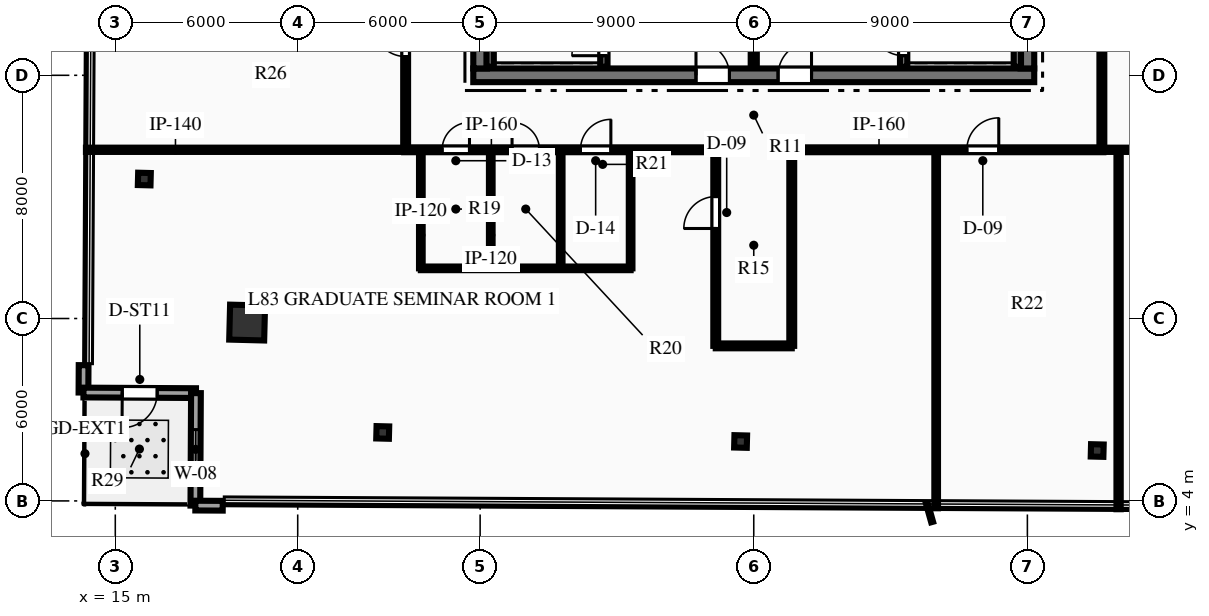
"""IFC4 building model, lengths in metres.
Left out: names, types, materials, properties, quantities, classifications, styles, units other than length and angle.
Written with IfcOpenShell. Run it as: python <this file> out.ifc"""

import sys

from ifc_helpers import new_model, si_unit, direction, frame, frame_2d, origin, origin_2d, place, context, subcontext, project, spatial, rectangle, hollow_rectangle, i_section, extrude, element, fill, save


model = new_model("IFC4")
c1 = context("Model", 3, precision=1e-05, world=origin(), true_north=direction((0.0, 1.0)))
c2 = subcontext(c1, "Body", "Model", "MODEL_VIEW")
j1 = project(units=[si_unit("LENGTHUNIT", "METRE"), si_unit("PLANEANGLEUNIT", "RADIAN")], contexts=[c1])
p1 = place(None, origin())
s1 = spatial("IfcSite", under=j1, at=p1, CompositionType="ELEMENT")
p2 = place(p1, origin())
s2 = spatial("IfcBuilding", under=s1, at=p2, CompositionType="ELEMENT")
p3 = place(p2, frame((0.0, 0.0, 328.95)))
s3 = spatial("IfcBuildingStorey", under=s2, at=p3, CompositionType="ELEMENT", Elevation=328.95)
p4 = place(p3, frame((26.775, 18.0, 0.0), z_axis=(0.0, 0.0, 1.0), x_axis=(1.0, 0.0, 0.0)))
e1 = element("IfcWall", 1, at=p4, inside=s3, PredefinedType="SHEAR", context=c2, shape_type="SweptSolid", body=[
    extrude(rectangle(XDim=18.45, YDim=0.45, at=frame_2d((9.225, 0.0))), origin(), (0.0, 0.0, 1.0), 3.75),
])
p5 = place(p4, frame((7.325, 0.0, 0.0)))
e2 = element("IfcOpeningElement", 2, at=p5, cuts=e1, PredefinedType="OPENING", context=c2, shape_type="SweptSolid", body=[
    extrude(rectangle(XDim=1.1, YDim=2.15, at=frame_2d((0.55, 1.075))), frame((0.0, 0.235, 0.0), z_axis=(0.0, -1.0, 0.0), x_axis=(1.0, 0.0, 0.0)), (0.0, 0.0, 1.0), 0.47),
])
p6 = place(p4, frame((10.025, 0.0, 0.0)))
e3 = element("IfcOpeningElement", 3, at=p6, cuts=e1, PredefinedType="OPENING", context=c2, shape_type="SweptSolid", body=[
    extrude(rectangle(XDim=1.1, YDim=2.15, at=frame_2d((0.55, 1.075))), frame((0.0, 0.235, 0.0), z_axis=(0.0, -1.0, 0.0), x_axis=(1.0, 0.0, 0.0)), (0.0, 0.0, 1.0), 0.47),
])
p7 = place(p3, frame((27.0, 18.225, 0.0), z_axis=(0.0, 0.0, 1.0), x_axis=(0.0, 1.0, 0.0)))
e4 = element("IfcWall", 4, at=p7, inside=s3, PredefinedType="SHEAR", context=c2, shape_type="SweptSolid", body=[
    extrude(rectangle(XDim=15.55, YDim=0.45, at=frame_2d((7.775, 0.0))), origin(), (0.0, 0.0, 1.0), 3.75),
])
p8 = place(p7, frame((10.015, 0.0, 0.0)))
e5 = element("IfcOpeningElement", 5, at=p8, cuts=e4, PredefinedType="OPENING", context=c2, shape_type="SweptSolid", body=[
    extrude(rectangle(XDim=1.4, YDim=2.2, at=frame_2d((0.7, 1.1))), frame((0.0, 0.235, 0.0), z_axis=(0.0, -1.0, 0.0), x_axis=(1.0, 0.0, 0.0)), (0.0, 0.0, 1.0), 0.47),
])
p9 = place(p3, frame((45.0, 18.225, 0.0), z_axis=(0.0, 0.0, 1.0), x_axis=(0.0, 1.0, 0.0)))
e6 = element("IfcWall", 6, at=p9, inside=s3, PredefinedType="SHEAR", context=c2, shape_type="SweptSolid", body=[
    extrude(rectangle(XDim=15.55, YDim=0.45, at=frame_2d((7.775, 0.0))), origin(), (0.0, 0.0, 1.0), 3.75),
])
p10 = place(p9, frame((10.015, 0.0, 0.0)))
e7 = element("IfcOpeningElement", 7, at=p10, cuts=e6, PredefinedType="OPENING", context=c2, shape_type="SweptSolid", body=[
    extrude(rectangle(XDim=1.4, YDim=2.2, at=frame_2d((0.7, 1.1))), frame((0.0, 0.235, 0.0), z_axis=(0.0, -1.0, 0.0), x_axis=(1.0, 0.0, 0.0)), (0.0, 0.0, 1.0), 0.47),
])
p11 = place(p3, frame((31.07, 18.28, 0.0), z_axis=(0.0, 0.0, 1.0), x_axis=(0.0, 1.0, 0.0)))
e8 = element("IfcWall", 8, at=p11, inside=s3, PredefinedType="SHEAR", context=c2, shape_type="SweptSolid", body=[
    extrude(rectangle(XDim=8.26, YDim=0.24, at=frame_2d((4.13, 0.0))), origin(), (0.0, 0.0, 1.0), 3.75),
])
p12 = place(p11, frame((0.365, 0.0, 0.0)))
e9 = element("IfcOpeningElement", 9, at=p12, cuts=e8, PredefinedType="OPENING", context=c2, shape_type="SweptSolid", body=[
    extrude(rectangle(XDim=1.05, YDim=2.15, at=frame_2d((0.525, 1.075))), frame((0.0, 0.13, 0.0), z_axis=(0.0, -1.0, 0.0), x_axis=(1.0, 0.0, 0.0)), (0.0, 0.0, 1.0), 0.26),
])
p13 = place(p3, frame((27.33, 18.28, 0.0), z_axis=(0.0, 0.0, 1.0), x_axis=(0.0, 1.0, 0.0)))
e10 = element("IfcWall", 10, at=p13, inside=s3, PredefinedType="SHEAR", context=c2, shape_type="SweptSolid", body=[
    extrude(rectangle(XDim=8.26, YDim=0.24, at=frame_2d((4.13, 0.0))), origin(), (0.0, 0.0, 1.0), 3.75),
])
p14 = place(p3, frame((40.93, 18.28, 0.0), z_axis=(0.0, 0.0, 1.0), x_axis=(0.0, 1.0, 0.0)))
e11 = element("IfcWall", 11, at=p14, inside=s3, PredefinedType="SHEAR", context=c2, shape_type="SweptSolid", body=[
    extrude(rectangle(XDim=8.26, YDim=0.24, at=frame_2d((4.13, 0.0))), origin(), (0.0, 0.0, 1.0), 3.75),
])
p15 = place(p14, frame((0.365, 0.0, 0.0)))
e12 = element("IfcOpeningElement", 12, at=p15, cuts=e11, PredefinedType="OPENING", context=c2, shape_type="SweptSolid", body=[
    extrude(rectangle(XDim=1.05, YDim=2.15, at=frame_2d((0.525, 1.075))), frame((0.0, 0.13, 0.0), z_axis=(0.0, -1.0, 0.0), x_axis=(1.0, 0.0, 0.0)), (0.0, 0.0, 1.0), 0.26),
])
p16 = place(p3, frame((44.67, 18.28, 0.0), z_axis=(0.0, 0.0, 1.0), x_axis=(0.0, 1.0, 0.0)))
e13 = element("IfcWall", 13, at=p16, inside=s3, PredefinedType="SHEAR", context=c2, shape_type="SweptSolid", body=[
    extrude(rectangle(XDim=8.26, YDim=0.24, at=frame_2d((4.13, 0.0))), origin(), (0.0, 0.0, 1.0), 3.75),
])
p17 = place(p3, frame((19.336, 9.866, 0.0), z_axis=(0.0, 0.0, 1.0), x_axis=(0.025304572866, 0.999679788028, 0.0)))
e14 = element("IfcColumn", 14, at=p17, inside=s3, PredefinedType="COLUMN", context=c2, shape_type="SweptSolid", body=[
    extrude(hollow_rectangle(XDim=1.15, YDim=1.15, WallThickness=0.05, at=origin_2d()), origin(), (0.0, 0.0, 1.0), 3.75),
])
for number, where, z_axis, x_axis in (
    (15, (15.955, 14.588, 0.0), (0.0, 0.0, 1.0), (0.025, 1.0, 0.0)),
    (16, (23.796, 6.252, 0.0), (0.0, 0.0, 1.0), (0.025, 1.0, 0.0)),
    (17, (35.568, 5.955, 0.0), (0.0, 0.0, 1.0), (0.025, 1.0, 0.0)),
    (18, (47.297, 5.658, 0.0), (0.0, 0.0, 1.0), (0.025, 1.0, 0.0)),
):
    element("IfcColumn", number, at=place(p3, frame(where, z_axis=z_axis, x_axis=x_axis)), inside=s3, PredefinedType="COLUMN", context=c2, shape_type="SweptSolid", body=[
        extrude(i_section(OverallWidth=0.406, OverallDepth=0.416, WebThickness=0.03, FlangeThickness=0.048, at=origin_2d()), origin(), (0.0, 0.0, 1.0), 3.75),
    ])
p18 = place(p3, frame((13.953, 7.565, 0.0), z_axis=(0.0, 0.0, 1.0), x_axis=(0.005425856104, 0.999985279934, 0.0)))
e19 = element("IfcWall", 19, at=p18, inside=s3, PredefinedType="STANDARD", context=c2, shape_type="SweptSolid", body=[
    extrude(rectangle(XDim=0.9, YDim=0.32, at=frame_2d((0.45, 0.0))), origin(), (0.0, 0.0, 1.0), 3.49),
])
p19 = place(p3, frame((17.653, 7.546, 0.0), z_axis=(0.0, 0.0, 1.0), x_axis=(-0.999986413629, 0.005212730233, 0.0)))
e20 = element("IfcWall", 20, at=p19, inside=s3, PredefinedType="STANDARD", context=c2, shape_type="SweptSolid", body=[
    extrude(rectangle(XDim=3.7, YDim=0.32, at=frame_2d((1.85, 0.0))), origin(), (0.0, 0.0, 1.0), 3.49),
])
p20 = place(p19, frame((1.275, 0.0, 0.0)))
e21 = element("IfcOpeningElement", 21, at=p20, cuts=e20, PredefinedType="OPENING", context=c2, shape_type="SweptSolid", body=[
    extrude(rectangle(XDim=1.15, YDim=2.2, at=frame_2d((0.575, 1.1))), frame((0.0, 0.17, 0.0), z_axis=(0.0, -1.0, 0.0), x_axis=(1.0, 0.0, 0.0)), (0.0, 0.0, 1.0), 0.34),
])
p21 = place(p3, frame((17.634, 3.846, 0.0), z_axis=(0.0, 0.0, 1.0), x_axis=(0.005212730233, 0.999986413629, 0.0)))
e22 = element("IfcWall", 22, at=p21, inside=s3, PredefinedType="STANDARD", context=c2, shape_type="SweptSolid", body=[
    extrude(rectangle(XDim=3.7, YDim=0.32, at=frame_2d((1.85, 0.0))), origin(), (0.0, 0.0, 1.0), 3.49),
])
p22 = place(p21, frame((1.2, 0.0, 0.85)))
e23 = element("IfcOpeningElement", 23, at=p22, cuts=e22, PredefinedType="OPENING", context=c2, shape_type="SweptSolid", body=[
    extrude(rectangle(XDim=1.3, YDim=1.9, at=frame_2d((0.65, 0.95))), frame((0.0, 0.17, 0.0), z_axis=(0.0, -1.0, 0.0), x_axis=(1.0, 0.0, 0.0)), (0.0, 0.0, 1.0), 0.34),
])
p23 = place(p3, frame((18.534, 3.841, 0.0), z_axis=(0.0, 0.0, 1.0), x_axis=(-0.999986715112, 0.005154570696, 0.0)))
e24 = element("IfcWall", 24, at=p23, inside=s3, PredefinedType="STANDARD", context=c2, shape_type="SweptSolid", body=[
    extrude(rectangle(XDim=0.9, YDim=0.32, at=frame_2d((0.45, 0.0))), origin(), (0.0, 0.0, 1.0), 3.49),
])
p24 = place(p3, frame((36.0, 18.28, 0.0), z_axis=(0.0, 0.0, 1.0), x_axis=(0.0, 1.0, 0.0)))
e25 = element("IfcWall", 25, at=p24, inside=s3, PredefinedType="PARTITIONING", context=c2, shape_type="SweptSolid", body=[
    extrude(rectangle(XDim=3.77, YDim=0.2, at=frame_2d((1.885, 0.0))), origin(), (0.0, 0.0, 1.0), 3.49),
])
p25 = place(p3, frame((24.5, 15.55, 0.0), z_axis=(0.0, 0.0, 1.0), x_axis=(1.0, 0.0, 0.0)))
e26 = element("IfcWall", 26, at=p25, inside=s3, PredefinedType="PARTITIONING", context=c2, shape_type="SweptSolid", body=[
    extrude(rectangle(XDim=10.25, YDim=0.16, at=frame_2d((5.125, 0.0))), origin(), (0.0, 0.0, 1.0), 3.49),
])
p26 = place(p25, frame((1.25, 0.0, 0.0)))
e27 = element("IfcOpeningElement", 27, at=p26, cuts=e26, PredefinedType="OPENING", context=c2, shape_type="SweptSolid", body=[
    extrude(rectangle(XDim=0.9, YDim=2.15, at=frame_2d((0.45, 1.075))), frame((0.0, 0.09, 0.0), z_axis=(0.0, -1.0, 0.0), x_axis=(1.0, 0.0, 0.0)), (0.0, 0.0, 1.0), 0.18),
])
p27 = place(p25, frame((3.55, 0.0, 0.0)))
e28 = element("IfcOpeningElement", 28, at=p27, cuts=e26, PredefinedType="OPENING", context=c2, shape_type="SweptSolid", body=[
    extrude(rectangle(XDim=0.9, YDim=2.15, at=frame_2d((0.45, 1.075))), frame((0.0, 0.09, 0.0), z_axis=(0.0, -1.0, 0.0), x_axis=(1.0, 0.0, 0.0)), (0.0, 0.0, 1.0), 0.18),
])
p28 = place(p25, frame((5.8, 0.0, 0.0)))
e29 = element("IfcOpeningElement", 29, at=p28, cuts=e26, PredefinedType="OPENING", context=c2, shape_type="SweptSolid", body=[
    extrude(rectangle(XDim=1.0, YDim=2.15, at=frame_2d((0.5, 1.075))), frame((0.0, 0.09, 0.0), z_axis=(0.0, -1.0, 0.0), x_axis=(1.0, 0.0, 0.0)), (0.0, 0.0, 1.0), 0.18),
])
p29 = place(p3, frame((37.25, 15.55, 0.0), z_axis=(0.0, 0.0, 1.0), x_axis=(1.0, 0.0, 0.0)))
e30 = element("IfcWall", 30, at=p29, inside=s3, PredefinedType="PARTITIONING", context=c2, shape_type="SweptSolid", body=[
    extrude(rectangle(XDim=10.25, YDim=0.16, at=frame_2d((5.125, 0.0))), origin(), (0.0, 0.0, 1.0), 3.49),
])
p30 = place(p29, frame((5.759, 0.0, 0.0)))
e31 = element("IfcOpeningElement", 31, at=p30, cuts=e30, PredefinedType="OPENING", context=c2, shape_type="SweptSolid", body=[
    extrude(rectangle(XDim=1.05, YDim=2.15, at=frame_2d((0.525, 1.075))), frame((0.0, 0.09, 0.0), z_axis=(0.0, -1.0, 0.0), x_axis=(1.0, 0.0, 0.0)), (0.0, 0.0, 1.0), 0.18),
])
p31 = place(p3, frame((24.55, 15.55, 0.0), z_axis=(0.0, 0.0, 1.0), x_axis=(0.0, 1.0, 0.0)))
e32 = element("IfcWall", 32, at=p31, inside=s3, PredefinedType="PARTITIONING", context=c2, shape_type="SweptSolid", body=[
    extrude(rectangle(XDim=9.2, YDim=0.16, at=frame_2d((4.6, 0.0))), origin(), (0.0, 0.0, 1.0), 3.49),
])
p32 = place(p31, frame((3.067, 0.0, 0.0)))
e33 = element("IfcOpeningElement", 33, at=p32, cuts=e32, PredefinedType="OPENING", context=c2, shape_type="SweptSolid", body=[
    extrude(rectangle(XDim=1.05, YDim=2.15, at=frame_2d((0.525, 1.075))), frame((0.0, 0.09, 0.0), z_axis=(0.0, -1.0, 0.0), x_axis=(1.0, 0.0, 0.0)), (0.0, 0.0, 1.0), 0.18),
])
p33 = place(p3, frame((47.45, 15.55, 0.0), z_axis=(0.0, 0.0, 1.0), x_axis=(0.0, 1.0, 0.0)))
e34 = element("IfcWall", 34, at=p33, inside=s3, PredefinedType="PARTITIONING", context=c2, shape_type="SweptSolid", body=[
    extrude(rectangle(XDim=9.2, YDim=0.16, at=frame_2d((4.6, 0.0))), origin(), (0.0, 0.0, 1.0), 3.49),
])
p34 = place(p3, frame((34.75, 9.1, 0.0), z_axis=(0.0, 0.0, 1.0), x_axis=(0.0, 1.0, 0.0)))
e35 = element("IfcWall", 35, at=p34, inside=s3, PredefinedType="PARTITIONING", context=c2, shape_type="SweptSolid", body=[
    extrude(rectangle(XDim=6.45, YDim=0.16, at=frame_2d((3.225, 0.0))), origin(), (0.0, 0.0, 1.0), 3.49),
])
p35 = place(p34, frame((3.861, 0.0, 0.0)))
e36 = element("IfcOpeningElement", 36, at=p35, cuts=e35, PredefinedType="OPENING", context=c2, shape_type="SweptSolid", body=[
    extrude(rectangle(XDim=1.05, YDim=2.15, at=frame_2d((0.525, 1.075))), frame((0.0, 0.09, 0.0), z_axis=(0.0, -1.0, 0.0), x_axis=(1.0, 0.0, 0.0)), (0.0, 0.0, 1.0), 0.18),
])
p36 = place(p3, frame((37.25, 9.1, 0.0), z_axis=(0.0, 0.0, 1.0), x_axis=(0.0, 1.0, 0.0)))
e37 = element("IfcWall", 37, at=p36, inside=s3, PredefinedType="PARTITIONING", context=c2, shape_type="SweptSolid", body=[
    extrude(rectangle(XDim=6.45, YDim=0.16, at=frame_2d((3.225, 0.0))), origin(), (0.0, 0.0, 1.0), 3.49),
])
p37 = place(p3, frame((34.75, 9.1, 0.0), z_axis=(0.0, 0.0, 1.0), x_axis=(1.0, 0.0, 0.0)))
e38 = element("IfcWall", 38, at=p37, inside=s3, PredefinedType="PARTITIONING", context=c2, shape_type="SweptSolid", body=[
    extrude(rectangle(XDim=2.5, YDim=0.16, at=frame_2d((1.25, 0.0))), origin(), (0.0, 0.0, 1.0), 3.49),
])
p38 = place(p3, frame((25.05, 11.65, 0.0), z_axis=(0.0, 0.0, 1.0), x_axis=(0.0, 1.0, 0.0)))
e39 = element("IfcWall", 39, at=p38, inside=s3, PredefinedType="PARTITIONING", context=c2, shape_type="SweptSolid", body=[
    extrude(rectangle(XDim=3.9, YDim=0.12, at=frame_2d((1.95, 0.0))), origin(), (0.0, 0.0, 1.0), 2.868),
])
for number, where, z_axis, x_axis in (
    (40, (27.35, 11.65, 0.0), (0.0, 0.0, 1.0), (0.0, 1.0, 0.0)),
    (41, (29.65, 11.65, 0.0), (0.0, 0.0, 1.0), (0.0, 1.0, 0.0)),
    (42, (31.95, 11.65, 0.0), (0.0, 0.0, 1.0), (0.0, 1.0, 0.0)),
):
    element("IfcWall", number, at=place(p3, frame(where, z_axis=z_axis, x_axis=x_axis)), inside=s3, PredefinedType="PARTITIONING", context=c2, shape_type="SweptSolid", body=[
        extrude(rectangle(XDim=3.9, YDim=0.12, at=frame_2d((1.95, 0.0))), origin(), (0.0, 0.0, 1.0), 3.49),
    ])
p39 = place(p3, frame((25.05, 11.65, 0.0), z_axis=(0.0, 0.0, 1.0), x_axis=(1.0, 0.0, 0.0)))
e43 = element("IfcWall", 43, at=p39, inside=s3, PredefinedType="PARTITIONING", context=c2, shape_type="SweptSolid", body=[
    extrude(rectangle(XDim=6.9, YDim=0.12, at=frame_2d((3.45, 0.0))), origin(), (0.0, 0.0, 1.0), 3.49),
])
p40 = place(p3, frame((14.035, 15.55, 0.0), z_axis=(0.0, 0.0, 1.0), x_axis=(1.0, 0.0, 0.0)))
e44 = element("IfcWall", 44, at=p40, inside=s3, PredefinedType="PARTITIONING", context=c2, shape_type="SweptSolid", body=[
    extrude(rectangle(XDim=10.515, YDim=0.14, at=frame_2d((5.258, 0.0))), origin(), (0.0, 0.0, 1.0), 2.868),
])
p41 = place(p3, frame((47.45, 15.55, 0.0), z_axis=(0.0, 0.0, 1.0), x_axis=(1.0, 0.0, 0.0)))
e45 = element("IfcWall", 45, at=p41, inside=s3, PredefinedType="PARTITIONING", context=c2, shape_type="SweptSolid", body=[
    extrude(rectangle(XDim=10.581, YDim=0.14, at=frame_2d((5.29, 0.0))), origin(), (0.0, 0.0, 1.0), 2.868),
])
p42 = place(p41, frame((2.669, 0.0, 0.0)))
e46 = element("IfcOpeningElement", 46, at=p42, cuts=e45, PredefinedType="OPENING", context=c2, shape_type="SweptSolid", body=[
    extrude(rectangle(XDim=0.95, YDim=2.15, at=frame_2d((0.475, 1.075))), frame((0.0, 0.08, 0.0), z_axis=(0.0, -1.0, 0.0), x_axis=(1.0, 0.0, 0.0)), (0.0, 0.0, 1.0), 0.16),
])
p43 = place(p3, frame((42.0, 3.758, 0.0), z_axis=(0.0, 0.0, 1.0), x_axis=(0.0, 1.0, 0.0)))
e47 = element("IfcWall", 47, at=p43, inside=s3, PredefinedType="PARTITIONING", context=c2, shape_type="SweptSolid", body=[
    extrude(rectangle(XDim=11.792, YDim=0.12, at=frame_2d((5.896, 0.0))), origin(), (0.0, 0.0, 1.0), 3.49),
])
p44 = place(p3, frame((48.0, 3.727, 0.0), z_axis=(0.0, 0.0, 1.0), x_axis=(0.0, 1.0, 0.0)))
e48 = element("IfcWall", 48, at=p44, inside=s3, PredefinedType="PARTITIONING", context=c2, shape_type="SweptSolid", body=[
    extrude(rectangle(XDim=11.823, YDim=0.14, at=frame_2d((5.912, 0.0))), origin(), (0.0, 0.0, 1.0), 3.49),
])
p45 = place(p20, origin())
e49 = element("IfcDoor", 49, at=p45, inside=s3, OperationType="SINGLE_SWING_RIGHT", PredefinedType="DOOR", context=c2, shape_type="SweptSolid", body=[
    extrude(rectangle(XDim=1.15, YDim=2.2, at=frame_2d((0.575, 1.1))), frame((0.0, 0.025, 0.0), z_axis=(0.0, -1.0, 0.0), x_axis=(1.0, 0.0, 0.0)), (0.0, 0.0, 1.0), 0.05),
])
fill(e21, e49)
p46 = place(p22, origin())
e50 = element("IfcWindow", 50, at=p46, inside=s3, PartitioningType="SINGLE_PANEL", PredefinedType="WINDOW", context=c2, shape_type="SweptSolid", body=[
    extrude(rectangle(XDim=1.3, YDim=1.9, at=frame_2d((0.65, 0.95))), frame((0.0, 0.03, 0.0), z_axis=(0.0, -1.0, 0.0), x_axis=(1.0, 0.0, 0.0)), (0.0, 0.0, 1.0), 0.06),
])
fill(e23, e50)
p47 = place(p12, origin())
e51 = element("IfcDoor", 51, at=p47, inside=s3, OperationType="SINGLE_SWING_LEFT", PredefinedType="DOOR", context=c2, shape_type="SweptSolid", body=[
    extrude(rectangle(XDim=1.05, YDim=2.15, at=frame_2d((0.525, 1.075))), frame((0.0, 0.025, 0.0), z_axis=(0.0, -1.0, 0.0), x_axis=(1.0, 0.0, 0.0)), (0.0, 0.0, 1.0), 0.05),
])
fill(e9, e51)
p48 = place(p15, origin())
e52 = element("IfcDoor", 52, at=p48, inside=s3, OperationType="SINGLE_SWING_RIGHT", PredefinedType="DOOR", context=c2, shape_type="SweptSolid", body=[
    extrude(rectangle(XDim=1.05, YDim=2.15, at=frame_2d((0.525, 1.075))), frame((0.0, 0.025, 0.0), z_axis=(0.0, -1.0, 0.0), x_axis=(1.0, 0.0, 0.0)), (0.0, 0.0, 1.0), 0.05),
])
fill(e12, e52)
p49 = place(p5, origin())
e53 = element("IfcDoor", 53, at=p49, inside=s3, OperationType="SINGLE_SWING_LEFT", PredefinedType="DOOR", context=c2, shape_type="SweptSolid", body=[
    extrude(rectangle(XDim=1.1, YDim=2.15, at=frame_2d((0.55, 1.075))), frame((0.0, 0.025, 0.0), z_axis=(0.0, -1.0, 0.0), x_axis=(1.0, 0.0, 0.0)), (0.0, 0.0, 1.0), 0.05),
])
fill(e2, e53)
p50 = place(p6, origin())
e54 = element("IfcDoor", 54, at=p50, inside=s3, OperationType="SINGLE_SWING_RIGHT", PredefinedType="DOOR", context=c2, shape_type="SweptSolid", body=[
    extrude(rectangle(XDim=1.1, YDim=2.15, at=frame_2d((0.55, 1.075))), frame((0.0, 0.025, 0.0), z_axis=(0.0, -1.0, 0.0), x_axis=(1.0, 0.0, 0.0)), (0.0, 0.0, 1.0), 0.05),
])
fill(e3, e54)
p51 = place(p26, origin())
e55 = element("IfcDoor", 55, at=p51, inside=s3, OperationType="SINGLE_SWING_RIGHT", PredefinedType="DOOR", context=c2, shape_type="SweptSolid", body=[
    extrude(rectangle(XDim=0.9, YDim=2.15, at=frame_2d((0.45, 1.075))), frame((0.0, 0.025, 0.0), z_axis=(0.0, -1.0, 0.0), x_axis=(1.0, 0.0, 0.0)), (0.0, 0.0, 1.0), 0.05),
])
fill(e27, e55)
p52 = place(p27, origin())
e56 = element("IfcDoor", 56, at=p52, inside=s3, OperationType="SINGLE_SWING_LEFT", PredefinedType="DOOR", context=c2, shape_type="SweptSolid", body=[
    extrude(rectangle(XDim=0.9, YDim=2.15, at=frame_2d((0.45, 1.075))), frame((0.0, 0.025, 0.0), z_axis=(0.0, -1.0, 0.0), x_axis=(1.0, 0.0, 0.0)), (0.0, 0.0, 1.0), 0.05),
])
fill(e28, e56)
p53 = place(p28, origin())
e57 = element("IfcDoor", 57, at=p53, inside=s3, OperationType="SINGLE_SWING_RIGHT", PredefinedType="DOOR", context=c2, shape_type="SweptSolid", body=[
    extrude(rectangle(XDim=1.0, YDim=2.15, at=frame_2d((0.5, 1.075))), frame((0.0, 0.025, 0.0), z_axis=(0.0, -1.0, 0.0), x_axis=(1.0, 0.0, 0.0)), (0.0, 0.0, 1.0), 0.05),
])
fill(e29, e57)
p54 = place(p35, origin())
e58 = element("IfcDoor", 58, at=p54, inside=s3, OperationType="SINGLE_SWING_LEFT", PredefinedType="DOOR", context=c2, shape_type="SweptSolid", body=[
    extrude(rectangle(XDim=1.05, YDim=2.15, at=frame_2d((0.525, 1.075))), frame((0.0, 0.025, 0.0), z_axis=(0.0, -1.0, 0.0), x_axis=(1.0, 0.0, 0.0)), (0.0, 0.0, 1.0), 0.05),
])
fill(e36, e58)
p55 = place(p30, origin())
e59 = element("IfcDoor", 59, at=p55, inside=s3, OperationType="SINGLE_SWING_RIGHT", PredefinedType="DOOR", context=c2, shape_type="SweptSolid", body=[
    extrude(rectangle(XDim=1.05, YDim=2.15, at=frame_2d((0.525, 1.075))), frame((0.0, 0.025, 0.0), z_axis=(0.0, -1.0, 0.0), x_axis=(1.0, 0.0, 0.0)), (0.0, 0.0, 1.0), 0.05),
])
fill(e31, e59)
p56 = place(p32, origin())
e60 = element("IfcDoor", 60, at=p56, inside=s3, OperationType="SINGLE_SWING_RIGHT", PredefinedType="DOOR", context=c2, shape_type="SweptSolid", body=[
    extrude(rectangle(XDim=1.05, YDim=2.15, at=frame_2d((0.525, 1.075))), frame((0.0, 0.025, 0.0), z_axis=(0.0, -1.0, 0.0), x_axis=(1.0, 0.0, 0.0)), (0.0, 0.0, 1.0), 0.05),
])
fill(e33, e60)
save(model, sys.argv[1])
